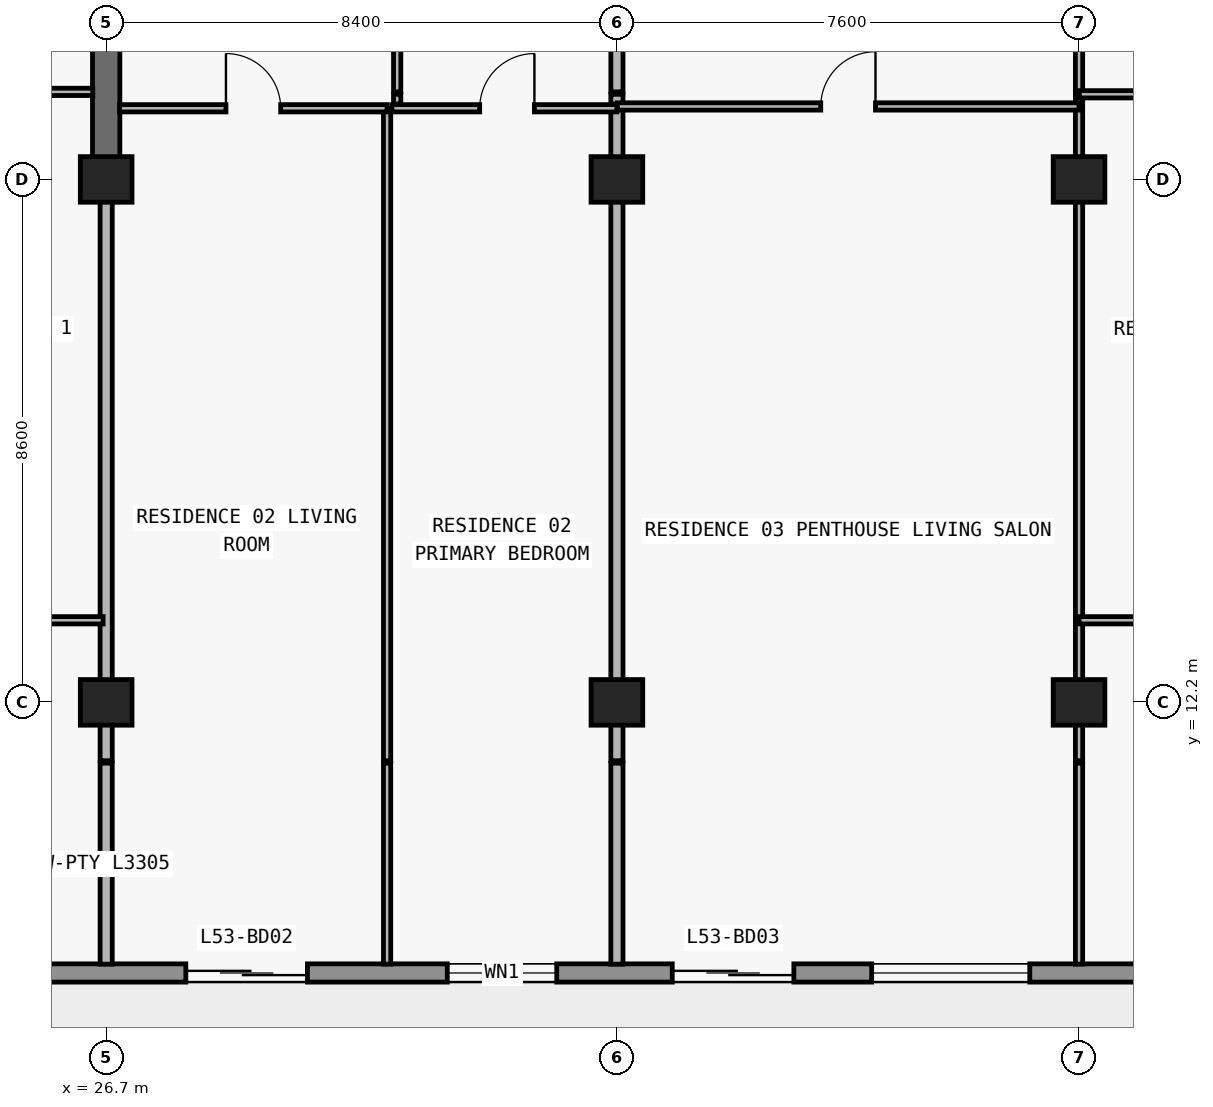
"""IFC4 building model, lengths in metres.
Left out: names, types, materials, properties, quantities, classifications, styles, units other than length and angle.
Written with IfcOpenShell. Run it as: python <this file> out.ifc"""

import sys

from ifc_helpers import new_model, si_unit, direction, frame, frame_2d, origin, origin_2d, place, context, subcontext, project, spatial, rectangle, extrude, element, fill, save


model = new_model("IFC4")
c1 = context("Model", 3, precision=1e-05, world=origin(), true_north=direction((0.0, 1.0)))
c2 = subcontext(c1, "Body", "Model", "MODEL_VIEW")
j1 = project(units=[si_unit("LENGTHUNIT", "METRE"), si_unit("PLANEANGLEUNIT", "RADIAN")], contexts=[c1])
p1 = place(None, origin())
s1 = spatial("IfcSite", under=j1, at=p1, CompositionType="ELEMENT")
p2 = place(p1, origin())
s2 = spatial("IfcBuilding", under=s1, at=p2, CompositionType="ELEMENT")
p3 = place(p2, frame((0.0, 0.0, 191.7)))
s3 = spatial("IfcBuildingStorey", under=s2, at=p3, CompositionType="ELEMENT", Elevation=191.7)
for number, where, z_axis, x_axis in (
    (1, (26.7, 12.2, 0.0), (0.0, 0.0, 1.0), (1.0, 0.0, 0.0)),
    (2, (35.1, 12.2, 0.0), (0.0, 0.0, 1.0), (1.0, 0.0, 0.0)),
    (3, (42.7, 12.2, 0.0), (0.0, 0.0, 1.0), (1.0, 0.0, 0.0)),
    (4, (26.7, 20.8, 0.0), (0.0, 0.0, 1.0), (1.0, 0.0, 0.0)),
    (5, (35.1, 20.8, 0.0), (0.0, 0.0, 1.0), (1.0, 0.0, 0.0)),
    (6, (42.7, 20.8, 0.0), (0.0, 0.0, 1.0), (1.0, 0.0, 0.0)),
):
    element("IfcColumn", number, at=place(p3, frame(where, z_axis=z_axis, x_axis=x_axis)), inside=s3, PredefinedType="COLUMN", context=c2, shape_type="SweptSolid", body=[
        extrude(rectangle(XDim=0.85, YDim=0.75, at=origin_2d()), origin(), (0.0, 0.0, 1.0), 3.05),
    ])
p4 = place(p3, frame((26.7, 20.8, 0.0), z_axis=(0.0, 0.0, 1.0), x_axis=(0.0, 1.0, 0.0)))
e7 = element("IfcWall", 7, at=p4, inside=s3, PredefinedType="SHEAR", context=c2, shape_type="SweptSolid", body=[
    extrude(rectangle(XDim=8.6, YDim=0.45, at=frame_2d((4.3, 0.0))), origin(), (0.0, 0.0, 1.0), 3.05),
])
p5 = place(p3, frame((67.7, 7.75, 0.0), z_axis=(0.0, 0.0, 1.0), x_axis=(-1.0, 0.0, 0.0)))
e8 = element("IfcWall", 8, at=p5, inside=s3, PredefinedType="STANDARD", context=c2, shape_type="SweptSolid", body=[
    extrude(rectangle(XDim=57.6, YDim=0.3, at=frame_2d((28.8, 0.0))), origin(), (0.0, 0.0, 1.0), 3.05),
])
p6 = place(p5, frame((54.69, 0.0, 0.0)))
e9 = element("IfcOpeningElement", 9, at=p6, cuts=e8, PredefinedType="OPENING", context=c2, shape_type="SweptSolid", body=[
    extrude(rectangle(XDim=2.0, YDim=2.3, at=frame_2d((1.0, 1.15))), frame((0.0, 0.16, 0.0), z_axis=(0.0, -1.0, 0.0), x_axis=(1.0, 0.0, 0.0)), (0.0, 0.0, 1.0), 0.32),
])
p7 = place(p5, frame((50.21, 0.0, 0.65)))
e10 = element("IfcOpeningElement", 10, at=p7, cuts=e8, PredefinedType="OPENING", context=c2, shape_type="SweptSolid", body=[
    extrude(rectangle(XDim=2.6, YDim=1.85, at=frame_2d((1.3, 0.925))), frame((0.0, 0.16, 0.0), z_axis=(0.0, -1.0, 0.0), x_axis=(1.0, 0.0, 0.0)), (0.0, 0.0, 1.0), 0.32),
])
p8 = place(p5, frame((44.1, 0.0, 0.85)))
e11 = element("IfcOpeningElement", 11, at=p8, cuts=e8, PredefinedType="OPENING", context=c2, shape_type="SweptSolid", body=[
    extrude(rectangle(XDim=2.2, YDim=1.55, at=frame_2d((1.1, 0.775))), frame((0.0, 0.16, 0.0), z_axis=(0.0, -1.0, 0.0), x_axis=(1.0, 0.0, 0.0)), (0.0, 0.0, 1.0), 0.32),
])
p9 = place(p5, frame((37.69, 0.0, 0.0)))
e12 = element("IfcOpeningElement", 12, at=p9, cuts=e8, PredefinedType="OPENING", context=c2, shape_type="SweptSolid", body=[
    extrude(rectangle(XDim=2.0, YDim=2.3, at=frame_2d((1.0, 1.15))), frame((0.0, 0.16, 0.0), z_axis=(0.0, -1.0, 0.0), x_axis=(1.0, 0.0, 0.0)), (0.0, 0.0, 1.0), 0.32),
])
p10 = place(p5, frame((33.59, 0.0, 0.85)))
e13 = element("IfcOpeningElement", 13, at=p10, cuts=e8, PredefinedType="OPENING", context=c2, shape_type="SweptSolid", body=[
    extrude(rectangle(XDim=1.8, YDim=1.55, at=frame_2d((0.9, 0.775))), frame((0.0, 0.16, 0.0), z_axis=(0.0, -1.0, 0.0), x_axis=(1.0, 0.0, 0.0)), (0.0, 0.0, 1.0), 0.32),
])
p11 = place(p5, frame((29.69, 0.0, 0.0)))
e14 = element("IfcOpeningElement", 14, at=p11, cuts=e8, PredefinedType="OPENING", context=c2, shape_type="SweptSolid", body=[
    extrude(rectangle(XDim=2.0, YDim=2.3, at=frame_2d((1.0, 1.15))), frame((0.0, 0.16, 0.0), z_axis=(0.0, -1.0, 0.0), x_axis=(1.0, 0.0, 0.0)), (0.0, 0.0, 1.0), 0.32),
])
p12 = place(p5, frame((25.81, 0.0, 0.65)))
e15 = element("IfcOpeningElement", 15, at=p12, cuts=e8, PredefinedType="OPENING", context=c2, shape_type="SweptSolid", body=[
    extrude(rectangle(XDim=2.6, YDim=1.85, at=frame_2d((1.3, 0.925))), frame((0.0, 0.16, 0.0), z_axis=(0.0, -1.0, 0.0), x_axis=(1.0, 0.0, 0.0)), (0.0, 0.0, 1.0), 0.32),
])
p13 = place(p5, frame((19.7, 0.0, 0.85)))
e16 = element("IfcOpeningElement", 16, at=p13, cuts=e8, PredefinedType="OPENING", context=c2, shape_type="SweptSolid", body=[
    extrude(rectangle(XDim=2.2, YDim=1.55, at=frame_2d((1.1, 0.775))), frame((0.0, 0.16, 0.0), z_axis=(0.0, -1.0, 0.0), x_axis=(1.0, 0.0, 0.0)), (0.0, 0.0, 1.0), 0.32),
])
p14 = place(p5, frame((13.29, 0.0, 0.0)))
e17 = element("IfcOpeningElement", 17, at=p14, cuts=e8, PredefinedType="OPENING", context=c2, shape_type="SweptSolid", body=[
    extrude(rectangle(XDim=2.0, YDim=2.3, at=frame_2d((1.0, 1.15))), frame((0.0, 0.16, 0.0), z_axis=(0.0, -1.0, 0.0), x_axis=(1.0, 0.0, 0.0)), (0.0, 0.0, 1.0), 0.32),
])
p15 = place(p5, frame((9.19, 0.0, 0.85)))
e18 = element("IfcOpeningElement", 18, at=p15, cuts=e8, PredefinedType="OPENING", context=c2, shape_type="SweptSolid", body=[
    extrude(rectangle(XDim=1.8, YDim=1.55, at=frame_2d((0.9, 0.775))), frame((0.0, 0.16, 0.0), z_axis=(0.0, -1.0, 0.0), x_axis=(1.0, 0.0, 0.0)), (0.0, 0.0, 1.0), 0.32),
])
p16 = place(p5, frame((5.273, 0.0, 0.0)))
e19 = element("IfcOpeningElement", 19, at=p16, cuts=e8, PredefinedType="OPENING", context=c2, shape_type="SweptSolid", body=[
    extrude(rectangle(XDim=2.0, YDim=2.3, at=frame_2d((1.0, 1.15))), frame((0.0, 0.16, 0.0), z_axis=(0.0, -1.0, 0.0), x_axis=(1.0, 0.0, 0.0)), (0.0, 0.0, 1.0), 0.32),
])
p17 = place(p5, frame((1.073, 0.0, 0.85)))
e20 = element("IfcOpeningElement", 20, at=p17, cuts=e8, PredefinedType="OPENING", context=c2, shape_type="SweptSolid", body=[
    extrude(rectangle(XDim=2.2, YDim=1.55, at=frame_2d((1.1, 0.775))), frame((0.0, 0.16, 0.0), z_axis=(0.0, -1.0, 0.0), x_axis=(1.0, 0.0, 0.0)), (0.0, 0.0, 1.0), 0.32),
])
p18 = place(p3, frame((26.7, 7.895, 0.0), z_axis=(0.0, 0.0, 1.0), x_axis=(0.0, 1.0, 0.0)))
e21 = element("IfcWall", 21, at=p18, inside=s3, PredefinedType="PARTITIONING", context=c2, shape_type="SweptSolid", body=[
    extrude(rectangle(XDim=3.305, YDim=0.2, at=frame_2d((1.652, 0.0))), origin(), (0.0, 0.0, 1.0), 3.05),
])
p19 = place(p3, frame((26.7, 11.24, 0.0), z_axis=(0.0, 0.0, 1.0), x_axis=(0.0, 1.0, 0.0)))
e22 = element("IfcWall", 22, at=p19, inside=s3, PredefinedType="PARTITIONING", context=c2, shape_type="SweptSolid", body=[
    extrude(rectangle(XDim=9.555, YDim=0.2, at=frame_2d((4.777, 0.0))), origin(), (0.0, 0.0, 1.0), 2.263),
])
p20 = place(p3, frame((31.32, 7.895, 0.0), z_axis=(0.0, 0.0, 1.0), x_axis=(0.0, 1.0, 0.0)))
e23 = element("IfcWall", 23, at=p20, inside=s3, PredefinedType="PARTITIONING", context=c2, shape_type="SweptSolid", body=[
    extrude(rectangle(XDim=3.305, YDim=0.12, at=frame_2d((1.652, 0.0))), origin(), (0.0, 0.0, 1.0), 3.05),
])
p21 = place(p3, frame((31.32, 11.24, 0.0), z_axis=(0.0, 0.0, 1.0), x_axis=(0.0, 1.0, 0.0)))
e24 = element("IfcWall", 24, at=p21, inside=s3, PredefinedType="PARTITIONING", context=c2, shape_type="SweptSolid", body=[
    extrude(rectangle(XDim=10.73, YDim=0.12, at=frame_2d((5.365, 0.0))), origin(), (0.0, 0.0, 1.0), 3.05),
])
p22 = place(p3, frame((31.486, 22.04, 0.0), z_axis=(0.0, 0.0, 1.0), x_axis=(0.0, 1.0, 0.0)))
e25 = element("IfcWall", 25, at=p22, inside=s3, PredefinedType="PARTITIONING", context=c2, shape_type="SweptSolid", body=[
    extrude(rectangle(XDim=0.16, YDim=0.12, at=frame_2d((0.08, 0.0))), origin(), (0.0, 0.0, 1.0), 3.05),
])
p23 = place(p3, frame((31.486, 22.24, 0.0), z_axis=(0.0, 0.0, 1.0), x_axis=(0.0, 1.0, 0.0)))
e26 = element("IfcWall", 26, at=p23, inside=s3, PredefinedType="PARTITIONING", context=c2, shape_type="SweptSolid", body=[
    extrude(rectangle(XDim=4.36, YDim=0.12, at=frame_2d((2.18, 0.0))), origin(), (0.0, 0.0, 1.0), 3.05),
])
p24 = place(p23, frame((1.73, 0.0, 0.0)))
e27 = element("IfcOpeningElement", 27, at=p24, cuts=e26, PredefinedType="OPENING", context=c2, shape_type="SweptSolid", body=[
    extrude(rectangle(XDim=0.9, YDim=2.15, at=frame_2d((0.45, 1.075))), frame((0.0, 0.07, 0.0), z_axis=(0.0, -1.0, 0.0), x_axis=(1.0, 0.0, 0.0)), (0.0, 0.0, 1.0), 0.14),
])
p25 = place(p3, frame((35.1, 7.895, 0.0), z_axis=(0.0, 0.0, 1.0), x_axis=(0.0, 1.0, 0.0)))
e28 = element("IfcWall", 28, at=p25, inside=s3, PredefinedType="PARTITIONING", context=c2, shape_type="SweptSolid", body=[
    extrude(rectangle(XDim=3.305, YDim=0.2, at=frame_2d((1.652, 0.0))), origin(), (0.0, 0.0, 1.0), 3.05),
])
p26 = place(p3, frame((35.1, 11.24, 0.0), z_axis=(0.0, 0.0, 1.0), x_axis=(0.0, 1.0, 0.0)))
e29 = element("IfcWall", 29, at=p26, inside=s3, PredefinedType="PARTITIONING", context=c2, shape_type="SweptSolid", body=[
    extrude(rectangle(XDim=10.73, YDim=0.2, at=frame_2d((5.365, 0.0))), origin(), (0.0, 0.0, 1.0), 2.263),
])
p27 = place(p3, frame((35.1, 22.04, 0.0), z_axis=(0.0, 0.0, 1.0), x_axis=(0.0, 1.0, 0.0)))
e30 = element("IfcWall", 30, at=p27, inside=s3, PredefinedType="PARTITIONING", context=c2, shape_type="SweptSolid", body=[
    extrude(rectangle(XDim=0.16, YDim=0.2, at=frame_2d((0.08, 0.0))), origin(), (0.0, 0.0, 1.0), 2.263),
])
p28 = place(p3, frame((35.1, 22.24, 0.0), z_axis=(0.0, 0.0, 1.0), x_axis=(0.0, 1.0, 0.0)))
e31 = element("IfcWall", 31, at=p28, inside=s3, PredefinedType="PARTITIONING", context=c2, shape_type="SweptSolid", body=[
    extrude(rectangle(XDim=4.36, YDim=0.2, at=frame_2d((2.18, 0.0))), origin(), (0.0, 0.0, 1.0), 2.263),
])
p29 = place(p3, frame((42.7, 7.895, 0.0), z_axis=(0.0, 0.0, 1.0), x_axis=(0.0, 1.0, 0.0)))
e32 = element("IfcWall", 32, at=p29, inside=s3, PredefinedType="PARTITIONING", context=c2, shape_type="SweptSolid", body=[
    extrude(rectangle(XDim=3.305, YDim=0.12, at=frame_2d((1.652, 0.0))), origin(), (0.0, 0.0, 1.0), 3.05),
])
p30 = place(p3, frame((42.7, 11.24, 0.0), z_axis=(0.0, 0.0, 1.0), x_axis=(0.0, 1.0, 0.0)))
e33 = element("IfcWall", 33, at=p30, inside=s3, PredefinedType="PARTITIONING", context=c2, shape_type="SweptSolid", body=[
    extrude(rectangle(XDim=10.73, YDim=0.12, at=frame_2d((5.365, 0.0))), origin(), (0.0, 0.0, 1.0), 2.263),
])
p31 = place(p3, frame((42.7, 22.04, 0.0), z_axis=(0.0, 0.0, 1.0), x_axis=(0.0, 1.0, 0.0)))
e34 = element("IfcWall", 34, at=p31, inside=s3, PredefinedType="PARTITIONING", context=c2, shape_type="SweptSolid", body=[
    extrude(rectangle(XDim=0.16, YDim=0.12, at=frame_2d((0.08, 0.0))), origin(), (0.0, 0.0, 1.0), 2.263),
])
p32 = place(p3, frame((42.7, 22.24, 0.0), z_axis=(0.0, 0.0, 1.0), x_axis=(0.0, 1.0, 0.0)))
e35 = element("IfcWall", 35, at=p32, inside=s3, PredefinedType="PARTITIONING", context=c2, shape_type="SweptSolid", body=[
    extrude(rectangle(XDim=4.36, YDim=0.12, at=frame_2d((2.18, 0.0))), origin(), (0.0, 0.0, 1.0), 2.263),
])
p33 = place(p32, frame((1.73, 0.0, 0.0)))
e36 = element("IfcOpeningElement", 36, at=p33, cuts=e35, PredefinedType="OPENING", context=c2, shape_type="SweptSolid", body=[
    extrude(rectangle(XDim=0.9, YDim=2.15, at=frame_2d((0.45, 1.075))), frame((0.0, 0.07, 0.0), z_axis=(0.0, -1.0, 0.0), x_axis=(1.0, 0.0, 0.0)), (0.0, 0.0, 1.0), 0.14),
])
p34 = place(p3, frame((18.3, 13.55, 0.0), z_axis=(0.0, 0.0, 1.0), x_axis=(1.0, 0.0, 0.0)))
e37 = element("IfcWall", 37, at=p34, inside=s3, PredefinedType="PARTITIONING", context=c2, shape_type="SweptSolid", body=[
    extrude(rectangle(XDim=8.35, YDim=0.12, at=frame_2d((4.175, 0.0))), origin(), (0.0, 0.0, 1.0), 3.05),
])
p35 = place(p34, frame((3.725, 0.0, 0.0)))
e38 = element("IfcOpeningElement", 38, at=p35, cuts=e37, PredefinedType="OPENING", context=c2, shape_type="SweptSolid", body=[
    extrude(rectangle(XDim=0.9, YDim=2.15, at=frame_2d((0.45, 1.075))), frame((0.0, 0.07, 0.0), z_axis=(0.0, -1.0, 0.0), x_axis=(1.0, 0.0, 0.0)), (0.0, 0.0, 1.0), 0.14),
])
p36 = place(p3, frame((42.7, 13.55, 0.0), z_axis=(0.0, 0.0, 1.0), x_axis=(1.0, 0.0, 0.0)))
e39 = element("IfcWall", 39, at=p36, inside=s3, PredefinedType="PARTITIONING", context=c2, shape_type="SweptSolid", body=[
    extrude(rectangle(XDim=8.4, YDim=0.12, at=frame_2d((4.2, 0.0))), origin(), (0.0, 0.0, 1.0), 3.05),
])
p37 = place(p36, frame((3.75, 0.0, 0.0)))
e40 = element("IfcOpeningElement", 40, at=p37, cuts=e39, PredefinedType="OPENING", context=c2, shape_type="SweptSolid", body=[
    extrude(rectangle(XDim=0.9, YDim=2.15, at=frame_2d((0.45, 1.075))), frame((0.0, 0.07, 0.0), z_axis=(0.0, -1.0, 0.0), x_axis=(1.0, 0.0, 0.0)), (0.0, 0.0, 1.0), 0.14),
])
p38 = place(p3, frame((26.92, 21.97, 0.0), z_axis=(0.0, 0.0, 1.0), x_axis=(1.0, 0.0, 0.0)))
e41 = element("IfcWall", 41, at=p38, inside=s3, PredefinedType="PARTITIONING", context=c2, shape_type="SweptSolid", body=[
    extrude(rectangle(XDim=4.4, YDim=0.12, at=frame_2d((2.2, 0.0))), origin(), (0.0, 0.0, 1.0), 3.05),
])
p39 = place(p38, frame((1.75, 0.0, 0.0)))
e42 = element("IfcOpeningElement", 42, at=p39, cuts=e41, PredefinedType="OPENING", context=c2, shape_type="SweptSolid", body=[
    extrude(rectangle(XDim=0.9, YDim=2.15, at=frame_2d((0.45, 1.075))), frame((0.0, 0.07, 0.0), z_axis=(0.0, -1.0, 0.0), x_axis=(1.0, 0.0, 0.0)), (0.0, 0.0, 1.0), 0.14),
])
p40 = place(p3, frame((31.4, 21.97, 0.0), z_axis=(0.0, 0.0, 1.0), x_axis=(1.0, 0.0, 0.0)))
e43 = element("IfcWall", 43, at=p40, inside=s3, PredefinedType="PARTITIONING", context=c2, shape_type="SweptSolid", body=[
    extrude(rectangle(XDim=3.7, YDim=0.12, at=frame_2d((1.85, 0.0))), origin(), (0.0, 0.0, 1.0), 3.05),
])
p41 = place(p40, frame((1.443, 0.0, 0.0)))
e44 = element("IfcOpeningElement", 44, at=p41, cuts=e43, PredefinedType="OPENING", context=c2, shape_type="SweptSolid", body=[
    extrude(rectangle(XDim=0.9, YDim=2.15, at=frame_2d((0.45, 1.075))), frame((0.0, 0.07, 0.0), z_axis=(0.0, -1.0, 0.0), x_axis=(1.0, 0.0, 0.0)), (0.0, 0.0, 1.0), 0.14),
])
p42 = place(p3, frame((35.105, 22.0, 0.0), z_axis=(0.0, 0.0, 1.0), x_axis=(1.0, 0.0, 0.0)))
e45 = element("IfcWall", 45, at=p42, inside=s3, PredefinedType="PARTITIONING", context=c2, shape_type="SweptSolid", body=[
    extrude(rectangle(XDim=7.595, YDim=0.12, at=frame_2d((3.797, 0.0))), origin(), (0.0, 0.0, 1.0), 3.05),
])
p43 = place(p42, frame((3.347, 0.0, 0.0)))
e46 = element("IfcOpeningElement", 46, at=p43, cuts=e45, PredefinedType="OPENING", context=c2, shape_type="SweptSolid", body=[
    extrude(rectangle(XDim=0.9, YDim=2.15, at=frame_2d((0.45, 1.075))), frame((0.0, 0.07, 0.0), z_axis=(0.0, -1.0, 0.0), x_axis=(1.0, 0.0, 0.0)), (0.0, 0.0, 1.0), 0.14),
])
p44 = place(p3, frame((42.705, 22.2, 0.0), z_axis=(0.0, 0.0, 1.0), x_axis=(1.0, 0.0, 0.0)))
e47 = element("IfcWall", 47, at=p44, inside=s3, PredefinedType="PARTITIONING", context=c2, shape_type="SweptSolid", body=[
    extrude(rectangle(XDim=8.175, YDim=0.12, at=frame_2d((4.087, 0.0))), origin(), (0.0, 0.0, 1.0), 3.05),
])
p45 = place(p44, frame((3.637, 0.0, 0.0)))
e48 = element("IfcOpeningElement", 48, at=p45, cuts=e47, PredefinedType="OPENING", context=c2, shape_type="SweptSolid", body=[
    extrude(rectangle(XDim=0.9, YDim=2.15, at=frame_2d((0.45, 1.075))), frame((0.0, 0.07, 0.0), z_axis=(0.0, -1.0, 0.0), x_axis=(1.0, 0.0, 0.0)), (0.0, 0.0, 1.0), 0.14),
])
p46 = place(p3, frame((18.305, 22.24, 0.0), z_axis=(0.0, 0.0, 1.0), x_axis=(1.0, 0.0, 0.0)))
e49 = element("IfcWall", 49, at=p46, inside=s3, PredefinedType="PARTITIONING", context=c2, shape_type="SweptSolid", body=[
    extrude(rectangle(XDim=8.175, YDim=0.12, at=frame_2d((4.087, 0.0))), origin(), (0.0, 0.0, 1.0), 3.05),
])
p47 = place(p46, frame((3.637, 0.0, 0.0)))
e50 = element("IfcOpeningElement", 50, at=p47, cuts=e49, PredefinedType="OPENING", context=c2, shape_type="SweptSolid", body=[
    extrude(rectangle(XDim=0.9, YDim=2.15, at=frame_2d((0.45, 1.075))), frame((0.0, 0.07, 0.0), z_axis=(0.0, -1.0, 0.0), x_axis=(1.0, 0.0, 0.0)), (0.0, 0.0, 1.0), 0.14),
])
p48 = place(p9, origin())
e51 = element("IfcDoor", 51, at=p48, inside=s3, OperationType="DOUBLE_DOOR_SLIDING", PredefinedType="DOOR", context=c2, shape_type="SweptSolid", body=[
    extrude(rectangle(XDim=2.0, YDim=2.3, at=frame_2d((1.0, 1.15))), frame((0.0, 0.025, 0.0), z_axis=(0.0, -1.0, 0.0), x_axis=(1.0, 0.0, 0.0)), (0.0, 0.0, 1.0), 0.05),
])
fill(e12, e51)
p49 = place(p10, origin())
e52 = element("IfcWindow", 52, at=p49, inside=s3, PartitioningType="SINGLE_PANEL", PredefinedType="WINDOW", context=c2, shape_type="SweptSolid", body=[
    extrude(rectangle(XDim=1.8, YDim=1.55, at=frame_2d((0.9, 0.775))), frame((0.0, 0.03, 0.0), z_axis=(0.0, -1.0, 0.0), x_axis=(1.0, 0.0, 0.0)), (0.0, 0.0, 1.0), 0.06),
])
fill(e13, e52)
p50 = place(p11, origin())
e53 = element("IfcDoor", 53, at=p50, inside=s3, OperationType="DOUBLE_DOOR_SLIDING", PredefinedType="DOOR", context=c2, shape_type="SweptSolid", body=[
    extrude(rectangle(XDim=2.0, YDim=2.3, at=frame_2d((1.0, 1.15))), frame((0.0, 0.025, 0.0), z_axis=(0.0, -1.0, 0.0), x_axis=(1.0, 0.0, 0.0)), (0.0, 0.0, 1.0), 0.05),
])
fill(e14, e53)
p51 = place(p12, origin())
e54 = element("IfcWindow", 54, at=p51, inside=s3, PartitioningType="SINGLE_PANEL", PredefinedType="WINDOW", context=c2, shape_type="SweptSolid", body=[
    extrude(rectangle(XDim=2.6, YDim=1.85, at=frame_2d((1.3, 0.925))), frame((0.0, 0.03, 0.0), z_axis=(0.0, -1.0, 0.0), x_axis=(1.0, 0.0, 0.0)), (0.0, 0.0, 1.0), 0.06),
])
fill(e15, e54)
p52 = place(p39, origin())
e55 = element("IfcDoor", 55, at=p52, inside=s3, OperationType="SINGLE_SWING_LEFT", PredefinedType="DOOR", context=c2, shape_type="SweptSolid", body=[
    extrude(rectangle(XDim=0.9, YDim=2.15, at=frame_2d((0.45, 1.075))), frame((0.0, 0.025, 0.0), z_axis=(0.0, -1.0, 0.0), x_axis=(1.0, 0.0, 0.0)), (0.0, 0.0, 1.0), 0.05),
])
fill(e42, e55)
p53 = place(p41, origin())
e56 = element("IfcDoor", 56, at=p53, inside=s3, OperationType="SINGLE_SWING_RIGHT", PredefinedType="DOOR", context=c2, shape_type="SweptSolid", body=[
    extrude(rectangle(XDim=0.9, YDim=2.15, at=frame_2d((0.45, 1.075))), frame((0.0, 0.025, 0.0), z_axis=(0.0, -1.0, 0.0), x_axis=(1.0, 0.0, 0.0)), (0.0, 0.0, 1.0), 0.05),
])
fill(e44, e56)
p54 = place(p43, origin())
e57 = element("IfcDoor", 57, at=p54, inside=s3, OperationType="SINGLE_SWING_RIGHT", PredefinedType="DOOR", context=c2, shape_type="SweptSolid", body=[
    extrude(rectangle(XDim=0.9, YDim=2.15, at=frame_2d((0.45, 1.075))), frame((0.0, 0.025, 0.0), z_axis=(0.0, -1.0, 0.0), x_axis=(1.0, 0.0, 0.0)), (0.0, 0.0, 1.0), 0.05),
])
fill(e46, e57)
save(model, sys.argv[1])
